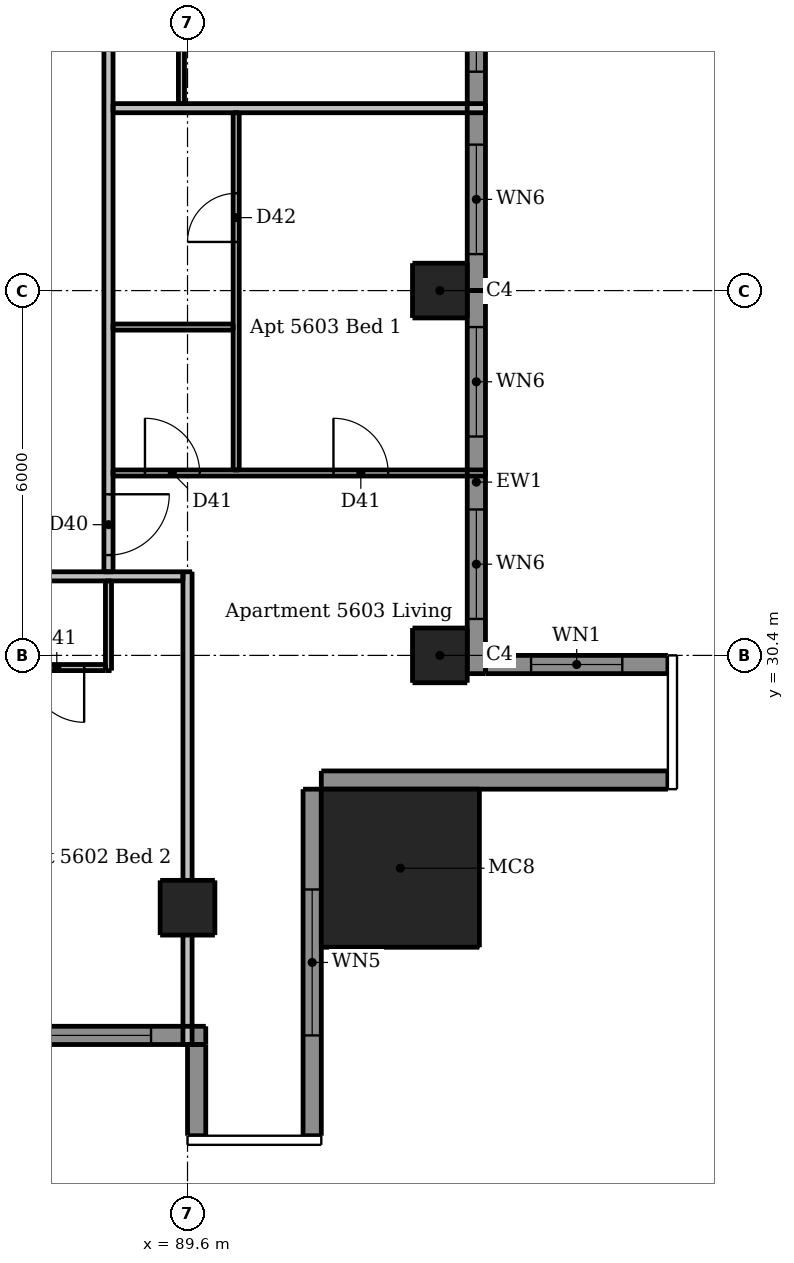
"""IFC4 building model, lengths in metres.
Left out: names, types, materials, properties, quantities, classifications, styles, units other than length and angle.
Written with IfcOpenShell. Run it as: python <this file> out.ifc"""

import sys

from ifc_helpers import new_model, si_unit, direction, frame, frame_2d, origin, origin_2d, place, context, subcontext, project, spatial, rectangle, extrude, element, fill, save


model = new_model("IFC4")
c1 = context("Model", 3, precision=1e-05, world=origin(), true_north=direction((0.0, 1.0)))
c2 = subcontext(c1, "Body", "Model", "MODEL_VIEW")
j1 = project(units=[si_unit("LENGTHUNIT", "METRE"), si_unit("PLANEANGLEUNIT", "RADIAN")], contexts=[c1])
p1 = place(None, origin())
s1 = spatial("IfcSite", under=j1, at=p1, CompositionType="ELEMENT")
p2 = place(p1, origin())
s2 = spatial("IfcBuilding", under=s1, at=p2, CompositionType="ELEMENT")
p3 = place(p2, frame((0.0, 0.0, 210.1)))
s3 = spatial("IfcBuildingStorey", under=s2, at=p3, CompositionType="ELEMENT", Elevation=210.1)
for number, where, z_axis, x_axis in (
    (1, (89.6, 26.25, 0.0), (0.0, 0.0, 1.0), (1.0, 0.0, 0.0)),
    (2, (93.75, 30.4, 0.0), (0.0, 0.0, 1.0), (1.0, 0.0, 0.0)),
    (3, (93.75, 36.4, 0.0), (0.0, 0.0, 1.0), (1.0, 0.0, 0.0)),
):
    element("IfcColumn", number, at=place(p3, frame(where, z_axis=z_axis, x_axis=x_axis)), inside=s3, PredefinedType="COLUMN", context=c2, shape_type="SweptSolid", body=[
        extrude(rectangle(XDim=0.9, YDim=0.9, at=origin_2d()), origin(), (0.0, 0.0, 1.0), 3.05),
    ])
p4 = place(p3, frame((93.1, 26.9, 0.0), z_axis=(0.0, 0.0, 1.0), x_axis=(1.0, 0.0, 0.0)))
e4 = element("IfcColumn", 4, at=p4, inside=s3, PredefinedType="COLUMN", context=c2, shape_type="SweptSolid", body=[
    extrude(rectangle(XDim=2.6, YDim=2.6, at=origin_2d()), origin(), (0.0, 0.0, 1.0), 3.3),
])
p5 = place(p3, frame((89.75, 24.0, 0.0), z_axis=(0.0, 0.0, 1.0), x_axis=(0.0, -1.0, 0.0)))
e5 = element("IfcWall", 5, at=p5, inside=s3, PredefinedType="SOLIDWALL", context=c2, shape_type="SweptSolid", body=[
    extrude(rectangle(XDim=1.5, YDim=0.3, at=frame_2d((0.75, 0.0))), origin(), (0.0, 0.0, 1.0), 3.05),
])
p6 = place(p3, frame((91.65, 22.5, 0.0), z_axis=(0.0, 0.0, 1.0), x_axis=(0.0, 1.0, 0.0)))
e6 = element("IfcWall", 6, at=p6, inside=s3, PredefinedType="SOLIDWALL", context=c2, shape_type="SweptSolid", body=[
    extrude(rectangle(XDim=5.7, YDim=0.3, at=frame_2d((2.85, 0.0))), origin(), (0.0, 0.0, 1.0), 3.05),
])
p7 = place(p6, frame((1.65, 0.0, 0.15)))
e7 = element("IfcOpeningElement", 7, at=p7, cuts=e6, PredefinedType="OPENING", context=c2, shape_type="SweptSolid", body=[
    extrude(rectangle(XDim=2.4, YDim=2.1, at=frame_2d((1.2, 1.05))), frame((0.0, 0.16, 0.0), z_axis=(0.0, -1.0, 0.0), x_axis=(1.0, 0.0, 0.0)), (0.0, 0.0, 1.0), 0.32),
])
p8 = place(p3, frame((91.8, 28.35, 0.0), z_axis=(0.0, 0.0, 1.0), x_axis=(1.0, 0.0, 0.0)))
e8 = element("IfcWall", 8, at=p8, inside=s3, PredefinedType="SOLIDWALL", context=c2, shape_type="SweptSolid", body=[
    extrude(rectangle(XDim=5.7, YDim=0.3, at=frame_2d((2.85, 0.0))), origin(), (0.0, 0.0, 1.0), 3.05),
])
p9 = place(p3, frame((97.5, 30.25, 0.0), z_axis=(0.0, 0.0, 1.0), x_axis=(-1.0, 0.0, 0.0)))
e9 = element("IfcWall", 9, at=p9, inside=s3, PredefinedType="SOLIDWALL", context=c2, shape_type="SweptSolid", body=[
    extrude(rectangle(XDim=3.0, YDim=0.3, at=frame_2d((1.5, 0.0))), origin(), (0.0, 0.0, 1.0), 3.05),
])
p10 = place(p9, frame((0.75, 0.0, 0.9)))
e10 = element("IfcOpeningElement", 10, at=p10, cuts=e9, PredefinedType="OPENING", context=c2, shape_type="SweptSolid", body=[
    extrude(rectangle(XDim=1.5, YDim=1.5, at=frame_2d((0.75, 0.75))), frame((0.0, 0.16, 0.0), z_axis=(0.0, -1.0, 0.0), x_axis=(1.0, 0.0, 0.0)), (0.0, 0.0, 1.0), 0.32),
])
p11 = place(p3, frame((83.6, 24.15, 0.0), z_axis=(0.0, 0.0, 1.0), x_axis=(1.0, 0.0, 0.0)))
e11 = element("IfcWall", 11, at=p11, inside=s3, PredefinedType="SOLIDWALL", context=c2, shape_type="SweptSolid", body=[
    extrude(rectangle(XDim=6.3, YDim=0.3, at=frame_2d((3.15, 0.0))), origin(), (0.0, 0.0, 1.0), 3.05),
])
p12 = place(p11, frame((0.6, 0.0, 0.15)))
e12 = element("IfcOpeningElement", 12, at=p12, cuts=e11, PredefinedType="OPENING", context=c2, shape_type="SweptSolid", body=[
    extrude(rectangle(XDim=1.8, YDim=2.1, at=frame_2d((0.9, 1.05))), frame((0.0, 0.16, 0.0), z_axis=(0.0, -1.0, 0.0), x_axis=(1.0, 0.0, 0.0)), (0.0, 0.0, 1.0), 0.32),
])
p13 = place(p11, frame((3.6, 0.0, 0.15)))
e13 = element("IfcOpeningElement", 13, at=p13, cuts=e11, PredefinedType="OPENING", context=c2, shape_type="SweptSolid", body=[
    extrude(rectangle(XDim=1.8, YDim=2.1, at=frame_2d((0.9, 1.05))), frame((0.0, 0.16, 0.0), z_axis=(0.0, -1.0, 0.0), x_axis=(1.0, 0.0, 0.0)), (0.0, 0.0, 1.0), 0.32),
])
p14 = place(p3, frame((94.35, 30.1, 0.0), z_axis=(0.0, 0.0, 1.0), x_axis=(0.0, 1.0, 0.0)))
e14 = element("IfcWall", 14, at=p14, inside=s3, PredefinedType="SOLIDWALL", context=c2, shape_type="SweptSolid", body=[
    extrude(rectangle(XDim=6.3, YDim=0.3, at=frame_2d((3.15, 0.0))), origin(), (0.0, 0.0, 1.0), 3.05),
])
p15 = place(p14, frame((0.9, 0.0, 0.15)))
e15 = element("IfcOpeningElement", 15, at=p15, cuts=e14, PredefinedType="OPENING", context=c2, shape_type="SweptSolid", body=[
    extrude(rectangle(XDim=1.8, YDim=2.1, at=frame_2d((0.9, 1.05))), frame((0.0, 0.16, 0.0), z_axis=(0.0, -1.0, 0.0), x_axis=(1.0, 0.0, 0.0)), (0.0, 0.0, 1.0), 0.32),
])
p16 = place(p14, frame((3.9, 0.0, 0.15)))
e16 = element("IfcOpeningElement", 16, at=p16, cuts=e14, PredefinedType="OPENING", context=c2, shape_type="SweptSolid", body=[
    extrude(rectangle(XDim=1.8, YDim=2.1, at=frame_2d((0.9, 1.05))), frame((0.0, 0.16, 0.0), z_axis=(0.0, -1.0, 0.0), x_axis=(1.0, 0.0, 0.0)), (0.0, 0.0, 1.0), 0.32),
])
p17 = place(p3, frame((94.35, 36.4, 0.0), z_axis=(0.0, 0.0, 1.0), x_axis=(0.0, 1.0, 0.0)))
e17 = element("IfcWall", 17, at=p17, inside=s3, PredefinedType="SOLIDWALL", context=c2, shape_type="SweptSolid", body=[
    extrude(rectangle(XDim=5.9, YDim=0.3, at=frame_2d((2.95, 0.0))), origin(), (0.0, 0.0, 1.0), 3.05),
])
p18 = place(p17, frame((0.6, 0.0, 0.15)))
e18 = element("IfcOpeningElement", 18, at=p18, cuts=e17, PredefinedType="OPENING", context=c2, shape_type="SweptSolid", body=[
    extrude(rectangle(XDim=1.8, YDim=2.1, at=frame_2d((0.9, 1.05))), frame((0.0, 0.16, 0.0), z_axis=(0.0, -1.0, 0.0), x_axis=(1.0, 0.0, 0.0)), (0.0, 0.0, 1.0), 0.32),
])
p19 = place(p17, frame((3.6, 0.0, 0.15)))
e19 = element("IfcOpeningElement", 19, at=p19, cuts=e17, PredefinedType="OPENING", context=c2, shape_type="SweptSolid", body=[
    extrude(rectangle(XDim=1.8, YDim=2.1, at=frame_2d((0.9, 1.05))), frame((0.0, 0.16, 0.0), z_axis=(0.0, -1.0, 0.0), x_axis=(1.0, 0.0, 0.0)), (0.0, 0.0, 1.0), 0.32),
])
p20 = place(p3, frame((88.3, 30.15, 0.0), z_axis=(0.0, 0.0, 1.0), x_axis=(0.0, 1.0, 0.0)))
e20 = element("IfcWall", 20, at=p20, inside=s3, PredefinedType="PARTITIONING", context=c2, shape_type="SweptSolid", body=[
    extrude(rectangle(XDim=1.475, YDim=0.1, at=frame_2d((0.738, 0.0))), origin(), (0.0, 0.0, 1.0), 3.05),
])
p21 = place(p3, frame((89.5, 60.325, 0.0), z_axis=(0.0, 0.0, 1.0), x_axis=(0.0, -1.0, 0.0)))
e21 = element("IfcWall", 21, at=p21, inside=s3, PredefinedType="PARTITIONING", context=c2, shape_type="SweptSolid", body=[
    extrude(rectangle(XDim=20.85, YDim=0.1, at=frame_2d((10.425, 0.0))), origin(), (0.0, 0.0, 1.0), 2.51),
])
p22 = place(p21, frame((12.975, 0.0, 0.0)))
e22 = element("IfcOpeningElement", 22, at=p22, cuts=e21, PredefinedType="OPENING", context=c2, shape_type="SweptSolid", body=[
    extrude(rectangle(XDim=0.9, YDim=2.1, at=frame_2d((0.45, 1.05))), frame((0.0, 0.06, 0.0), z_axis=(0.0, -1.0, 0.0), x_axis=(1.0, 0.0, 0.0)), (0.0, 0.0, 1.0), 0.12),
])
p23 = place(p21, frame((6.975, 0.0, 0.0)))
e23 = element("IfcOpeningElement", 23, at=p23, cuts=e21, PredefinedType="OPENING", context=c2, shape_type="SweptSolid", body=[
    extrude(rectangle(XDim=0.9, YDim=2.1, at=frame_2d((0.45, 1.05))), frame((0.0, 0.06, 0.0), z_axis=(0.0, -1.0, 0.0), x_axis=(1.0, 0.0, 0.0)), (0.0, 0.0, 1.0), 0.12),
])
p24 = place(p21, frame((18.975, 0.0, 0.0)))
e24 = element("IfcOpeningElement", 24, at=p24, cuts=e21, PredefinedType="OPENING", context=c2, shape_type="SweptSolid", body=[
    extrude(rectangle(XDim=0.9, YDim=2.1, at=frame_2d((0.45, 1.05))), frame((0.0, 0.06, 0.0), z_axis=(0.0, -1.0, 0.0), x_axis=(1.0, 0.0, 0.0)), (0.0, 0.0, 1.0), 0.12),
])
p25 = place(p21, frame((1.275, 0.0, 0.0)))
e25 = element("IfcOpeningElement", 25, at=p25, cuts=e21, PredefinedType="OPENING", context=c2, shape_type="SweptSolid", body=[
    extrude(rectangle(XDim=0.9, YDim=2.1, at=frame_2d((0.45, 1.05))), frame((0.0, 0.06, 0.0), z_axis=(0.0, -1.0, 0.0), x_axis=(1.0, 0.0, 0.0)), (0.0, 0.0, 1.0), 0.12),
])
p26 = place(p21, frame((4.325, 0.0, 0.0)))
e26 = element("IfcOpeningElement", 26, at=p26, cuts=e21, PredefinedType="OPENING", context=c2, shape_type="SweptSolid", body=[
    extrude(rectangle(XDim=0.8, YDim=2.1, at=frame_2d((0.4, 1.05))), frame((0.0, 0.06, 0.0), z_axis=(0.0, -1.0, 0.0), x_axis=(1.0, 0.0, 0.0)), (0.0, 0.0, 1.0), 0.12),
])
p27 = place(p3, frame((90.4, 33.45, 0.0), z_axis=(0.0, 0.0, 1.0), x_axis=(0.0, 1.0, 0.0)))
e27 = element("IfcWall", 27, at=p27, inside=s3, PredefinedType="PARTITIONING", context=c2, shape_type="SweptSolid", body=[
    extrude(rectangle(XDim=5.875, YDim=0.1, at=frame_2d((2.938, 0.0))), origin(), (0.0, 0.0, 1.0), 3.05),
])
p28 = place(p27, frame((3.75, 0.0, 0.0)))
e28 = element("IfcOpeningElement", 28, at=p28, cuts=e27, PredefinedType="OPENING", context=c2, shape_type="SweptSolid", body=[
    extrude(rectangle(XDim=0.8, YDim=2.1, at=frame_2d((0.4, 1.05))), frame((0.0, 0.06, 0.0), z_axis=(0.0, -1.0, 0.0), x_axis=(1.0, 0.0, 0.0)), (0.0, 0.0, 1.0), 0.12),
])
p29 = place(p3, frame((88.375, 35.8, 0.0), z_axis=(0.0, 0.0, 1.0), x_axis=(1.0, 0.0, 0.0)))
e29 = element("IfcWall", 29, at=p29, inside=s3, PredefinedType="PARTITIONING", context=c2, shape_type="SweptSolid", body=[
    extrude(rectangle(XDim=1.975, YDim=0.1, at=frame_2d((0.988, 0.0))), origin(), (0.0, 0.0, 1.0), 3.05),
])
p30 = place(p3, frame((88.375, 33.4, 0.0), z_axis=(0.0, 0.0, 1.0), x_axis=(1.0, 0.0, 0.0)))
e30 = element("IfcWall", 30, at=p30, inside=s3, PredefinedType="PARTITIONING", context=c2, shape_type="SweptSolid", body=[
    extrude(rectangle(XDim=6.125, YDim=0.1, at=frame_2d((3.062, 0.0))), origin(), (0.0, 0.0, 1.0), 3.05),
])
p31 = place(p30, frame((0.525, 0.0, 0.0)))
e31 = element("IfcOpeningElement", 31, at=p31, cuts=e30, PredefinedType="OPENING", context=c2, shape_type="SweptSolid", body=[
    extrude(rectangle(XDim=0.9, YDim=2.1, at=frame_2d((0.45, 1.05))), frame((0.0, 0.06, 0.0), z_axis=(0.0, -1.0, 0.0), x_axis=(1.0, 0.0, 0.0)), (0.0, 0.0, 1.0), 0.12),
])
p32 = place(p30, frame((3.625, 0.0, 0.0)))
e32 = element("IfcOpeningElement", 32, at=p32, cuts=e30, PredefinedType="OPENING", context=c2, shape_type="SweptSolid", body=[
    extrude(rectangle(XDim=0.9, YDim=2.1, at=frame_2d((0.45, 1.05))), frame((0.0, 0.06, 0.0), z_axis=(0.0, -1.0, 0.0), x_axis=(1.0, 0.0, 0.0)), (0.0, 0.0, 1.0), 0.12),
])
p33 = place(p3, frame((88.25, 30.2, 0.0), z_axis=(0.0, 0.0, 1.0), x_axis=(-1.0, 0.0, 0.0)))
e33 = element("IfcWall", 33, at=p33, inside=s3, PredefinedType="PARTITIONING", context=c2, shape_type="SweptSolid", body=[
    extrude(rectangle(XDim=16.575, YDim=0.1, at=frame_2d((8.288, 0.0))), origin(), (0.0, 0.0, 1.0), 3.05),
])
p34 = place(p33, frame((13.15, 0.0, 0.0)))
e34 = element("IfcOpeningElement", 34, at=p34, cuts=e33, PredefinedType="OPENING", context=c2, shape_type="SweptSolid", body=[
    extrude(rectangle(XDim=0.9, YDim=2.1, at=frame_2d((0.45, 1.05))), frame((0.0, 0.06, 0.0), z_axis=(0.0, -1.0, 0.0), x_axis=(1.0, 0.0, 0.0)), (0.0, 0.0, 1.0), 0.12),
])
p35 = place(p33, frame((8.6, 0.0, 0.0)))
e35 = element("IfcOpeningElement", 35, at=p35, cuts=e33, PredefinedType="OPENING", context=c2, shape_type="SweptSolid", body=[
    extrude(rectangle(XDim=0.9, YDim=2.1, at=frame_2d((0.45, 1.05))), frame((0.0, 0.06, 0.0), z_axis=(0.0, -1.0, 0.0), x_axis=(1.0, 0.0, 0.0)), (0.0, 0.0, 1.0), 0.12),
])
p36 = place(p33, frame((2.95, 0.0, 0.0)))
e36 = element("IfcOpeningElement", 36, at=p36, cuts=e33, PredefinedType="OPENING", context=c2, shape_type="SweptSolid", body=[
    extrude(rectangle(XDim=0.9, YDim=2.1, at=frame_2d((0.45, 1.05))), frame((0.0, 0.06, 0.0), z_axis=(0.0, -1.0, 0.0), x_axis=(1.0, 0.0, 0.0)), (0.0, 0.0, 1.0), 0.12),
])
p37 = place(p33, frame((0.35, 0.0, 0.0)))
e37 = element("IfcOpeningElement", 37, at=p37, cuts=e33, PredefinedType="OPENING", context=c2, shape_type="SweptSolid", body=[
    extrude(rectangle(XDim=0.9, YDim=2.1, at=frame_2d((0.45, 1.05))), frame((0.0, 0.06, 0.0), z_axis=(0.0, -1.0, 0.0), x_axis=(1.0, 0.0, 0.0)), (0.0, 0.0, 1.0), 0.12),
])
p38 = place(p33, frame((5.95, 0.0, 0.0)))
e38 = element("IfcOpeningElement", 38, at=p38, cuts=e33, PredefinedType="OPENING", context=c2, shape_type="SweptSolid", body=[
    extrude(rectangle(XDim=0.8, YDim=2.1, at=frame_2d((0.4, 1.05))), frame((0.0, 0.06, 0.0), z_axis=(0.0, -1.0, 0.0), x_axis=(1.0, 0.0, 0.0)), (0.0, 0.0, 1.0), 0.12),
])
p39 = place(p3, frame((88.3, 61.175, 0.0), z_axis=(0.0, 0.0, 1.0), x_axis=(0.0, -1.0, 0.0)))
e39 = element("IfcWall", 39, at=p39, inside=s3, PredefinedType="PARTITIONING", context=c2, shape_type="SweptSolid", body=[
    extrude(rectangle(XDim=29.4, YDim=0.15, at=frame_2d((14.7, 0.0))), origin(), (0.0, 0.0, 1.0), 3.05),
])
p40 = place(p39, frame((28.125, 0.0, 0.0)))
e40 = element("IfcOpeningElement", 40, at=p40, cuts=e39, PredefinedType="OPENING", context=c2, shape_type="SweptSolid", body=[
    extrude(rectangle(XDim=1.0, YDim=2.1, at=frame_2d((0.5, 1.05))), frame((0.0, 0.085, 0.0), z_axis=(0.0, -1.0, 0.0), x_axis=(1.0, 0.0, 0.0)), (0.0, 0.0, 1.0), 0.17),
])
p41 = place(p39, frame((10.775, 0.0, 0.0)))
e41 = element("IfcOpeningElement", 41, at=p41, cuts=e39, PredefinedType="OPENING", context=c2, shape_type="SweptSolid", body=[
    extrude(rectangle(XDim=1.0, YDim=2.1, at=frame_2d((0.5, 1.05))), frame((0.0, 0.085, 0.0), z_axis=(0.0, -1.0, 0.0), x_axis=(1.0, 0.0, 0.0)), (0.0, 0.0, 1.0), 0.17),
])
p42 = place(p3, frame((89.6, 24.0, 0.0), z_axis=(0.0, 0.0, 1.0), x_axis=(0.0, 1.0, 0.0)))
e42 = element("IfcWall", 42, at=p42, inside=s3, PredefinedType="PARTITIONING", context=c2, shape_type="SweptSolid", body=[
    extrude(rectangle(XDim=7.775, YDim=0.15, at=frame_2d((3.887, 0.0))), origin(), (0.0, 0.0, 1.0), 2.516),
])
p43 = place(p3, frame((88.375, 39.4, 0.0), z_axis=(0.0, 0.0, 1.0), x_axis=(1.0, 0.0, 0.0)))
e43 = element("IfcWall", 43, at=p43, inside=s3, PredefinedType="PARTITIONING", context=c2, shape_type="SweptSolid", body=[
    extrude(rectangle(XDim=6.125, YDim=0.15, at=frame_2d((3.062, 0.0))), origin(), (0.0, 0.0, 1.0), 3.05),
])
p44 = place(p3, frame((89.525, 31.7, 0.0), z_axis=(0.0, 0.0, 1.0), x_axis=(-1.0, 0.0, 0.0)))
e44 = element("IfcWall", 44, at=p44, inside=s3, PredefinedType="PARTITIONING", context=c2, shape_type="SweptSolid", body=[
    extrude(rectangle(XDim=30.55, YDim=0.15, at=frame_2d((15.275, 0.0))), origin(), (0.0, 0.0, 1.0), 3.05),
])
p45 = place(p44, frame((26.775, 0.0, 0.0)))
e45 = element("IfcOpeningElement", 45, at=p45, cuts=e44, PredefinedType="OPENING", context=c2, shape_type="SweptSolid", body=[
    extrude(rectangle(XDim=1.0, YDim=2.1, at=frame_2d((0.5, 1.05))), frame((0.0, 0.085, 0.0), z_axis=(0.0, -1.0, 0.0), x_axis=(1.0, 0.0, 0.0)), (0.0, 0.0, 1.0), 0.17),
])
p46 = place(p44, frame((9.075, 0.0, 0.0)))
e46 = element("IfcOpeningElement", 46, at=p46, cuts=e44, PredefinedType="OPENING", context=c2, shape_type="SweptSolid", body=[
    extrude(rectangle(XDim=1.0, YDim=2.1, at=frame_2d((0.5, 1.05))), frame((0.0, 0.085, 0.0), z_axis=(0.0, -1.0, 0.0), x_axis=(1.0, 0.0, 0.0)), (0.0, 0.0, 1.0), 0.17),
])
p47 = place(p7, origin())
e47 = element("IfcWindow", 47, at=p47, inside=s3, PartitioningType="DOUBLE_PANEL_VERTICAL", PredefinedType="WINDOW", context=c2, shape_type="SweptSolid", body=[
    extrude(rectangle(XDim=2.4, YDim=2.1, at=frame_2d((1.2, 1.05))), frame((0.0, 0.03, 0.0), z_axis=(0.0, -1.0, 0.0), x_axis=(1.0, 0.0, 0.0)), (0.0, 0.0, 1.0), 0.06),
])
fill(e7, e47)
p48 = place(p10, origin())
e48 = element("IfcWindow", 48, at=p48, inside=s3, PartitioningType="DOUBLE_PANEL_VERTICAL", PredefinedType="WINDOW", context=c2, shape_type="SweptSolid", body=[
    extrude(rectangle(XDim=1.5, YDim=1.5, at=frame_2d((0.75, 0.75))), frame((0.0, 0.03, 0.0), z_axis=(0.0, -1.0, 0.0), x_axis=(1.0, 0.0, 0.0)), (0.0, 0.0, 1.0), 0.06),
])
fill(e10, e48)
p49 = place(p13, origin())
e49 = element("IfcWindow", 49, at=p49, inside=s3, PartitioningType="DOUBLE_PANEL_VERTICAL", PredefinedType="WINDOW", context=c2, shape_type="SweptSolid", body=[
    extrude(rectangle(XDim=1.8, YDim=2.1, at=frame_2d((0.9, 1.05))), frame((0.0, 0.03, 0.0), z_axis=(0.0, -1.0, 0.0), x_axis=(1.0, 0.0, 0.0)), (0.0, 0.0, 1.0), 0.06),
])
fill(e13, e49)
p50 = place(p15, origin())
e50 = element("IfcWindow", 50, at=p50, inside=s3, PartitioningType="DOUBLE_PANEL_VERTICAL", PredefinedType="WINDOW", context=c2, shape_type="SweptSolid", body=[
    extrude(rectangle(XDim=1.8, YDim=2.1, at=frame_2d((0.9, 1.05))), frame((0.0, 0.03, 0.0), z_axis=(0.0, -1.0, 0.0), x_axis=(1.0, 0.0, 0.0)), (0.0, 0.0, 1.0), 0.06),
])
fill(e15, e50)
p51 = place(p16, origin())
e51 = element("IfcWindow", 51, at=p51, inside=s3, PartitioningType="DOUBLE_PANEL_VERTICAL", PredefinedType="WINDOW", context=c2, shape_type="SweptSolid", body=[
    extrude(rectangle(XDim=1.8, YDim=2.1, at=frame_2d((0.9, 1.05))), frame((0.0, 0.03, 0.0), z_axis=(0.0, -1.0, 0.0), x_axis=(1.0, 0.0, 0.0)), (0.0, 0.0, 1.0), 0.06),
])
fill(e16, e51)
p52 = place(p18, origin())
e52 = element("IfcWindow", 52, at=p52, inside=s3, PartitioningType="DOUBLE_PANEL_VERTICAL", PredefinedType="WINDOW", context=c2, shape_type="SweptSolid", body=[
    extrude(rectangle(XDim=1.8, YDim=2.1, at=frame_2d((0.9, 1.05))), frame((0.0, 0.03, 0.0), z_axis=(0.0, -1.0, 0.0), x_axis=(1.0, 0.0, 0.0)), (0.0, 0.0, 1.0), 0.06),
])
fill(e18, e52)
p53 = place(p19, origin())
e53 = element("IfcWindow", 53, at=p53, inside=s3, PartitioningType="DOUBLE_PANEL_VERTICAL", PredefinedType="WINDOW", context=c2, shape_type="SweptSolid", body=[
    extrude(rectangle(XDim=1.8, YDim=2.1, at=frame_2d((0.9, 1.05))), frame((0.0, 0.03, 0.0), z_axis=(0.0, -1.0, 0.0), x_axis=(1.0, 0.0, 0.0)), (0.0, 0.0, 1.0), 0.06),
])
fill(e19, e53)
p54 = place(p37, origin())
e54 = element("IfcDoor", 54, at=p54, inside=s3, OperationType="SINGLE_SWING_LEFT", PredefinedType="DOOR", context=c2, shape_type="SweptSolid", body=[
    extrude(rectangle(XDim=0.9, YDim=2.1, at=frame_2d((0.45, 1.05))), frame((0.0, 0.025, 0.0), z_axis=(0.0, -1.0, 0.0), x_axis=(1.0, 0.0, 0.0)), (0.0, 0.0, 1.0), 0.05),
])
fill(e37, e54)
p55 = place(p40, origin())
e55 = element("IfcDoor", 55, at=p55, inside=s3, OperationType="SINGLE_SWING_LEFT", PredefinedType="DOOR", context=c2, shape_type="SweptSolid", body=[
    extrude(rectangle(XDim=1.0, YDim=2.1, at=frame_2d((0.5, 1.05))), frame((0.0, 0.025, 0.0), z_axis=(0.0, -1.0, 0.0), x_axis=(1.0, 0.0, 0.0)), (0.0, 0.0, 1.0), 0.05),
])
fill(e40, e55)
p56 = place(p31, origin())
e56 = element("IfcDoor", 56, at=p56, inside=s3, OperationType="SINGLE_SWING_LEFT", PredefinedType="DOOR", context=c2, shape_type="SweptSolid", body=[
    extrude(rectangle(XDim=0.9, YDim=2.1, at=frame_2d((0.45, 1.05))), frame((0.0, 0.025, 0.0), z_axis=(0.0, -1.0, 0.0), x_axis=(1.0, 0.0, 0.0)), (0.0, 0.0, 1.0), 0.05),
])
fill(e31, e56)
p57 = place(p32, origin())
e57 = element("IfcDoor", 57, at=p57, inside=s3, OperationType="SINGLE_SWING_LEFT", PredefinedType="DOOR", context=c2, shape_type="SweptSolid", body=[
    extrude(rectangle(XDim=0.9, YDim=2.1, at=frame_2d((0.45, 1.05))), frame((0.0, 0.025, 0.0), z_axis=(0.0, -1.0, 0.0), x_axis=(1.0, 0.0, 0.0)), (0.0, 0.0, 1.0), 0.05),
])
fill(e32, e57)
p58 = place(p28, origin())
e58 = element("IfcDoor", 58, at=p58, inside=s3, OperationType="SINGLE_SWING_LEFT", PredefinedType="DOOR", context=c2, shape_type="SweptSolid", body=[
    extrude(rectangle(XDim=0.8, YDim=2.1, at=frame_2d((0.4, 1.05))), frame((0.0, 0.025, 0.0), z_axis=(0.0, -1.0, 0.0), x_axis=(1.0, 0.0, 0.0)), (0.0, 0.0, 1.0), 0.05),
])
fill(e28, e58)
save(model, sys.argv[1])
